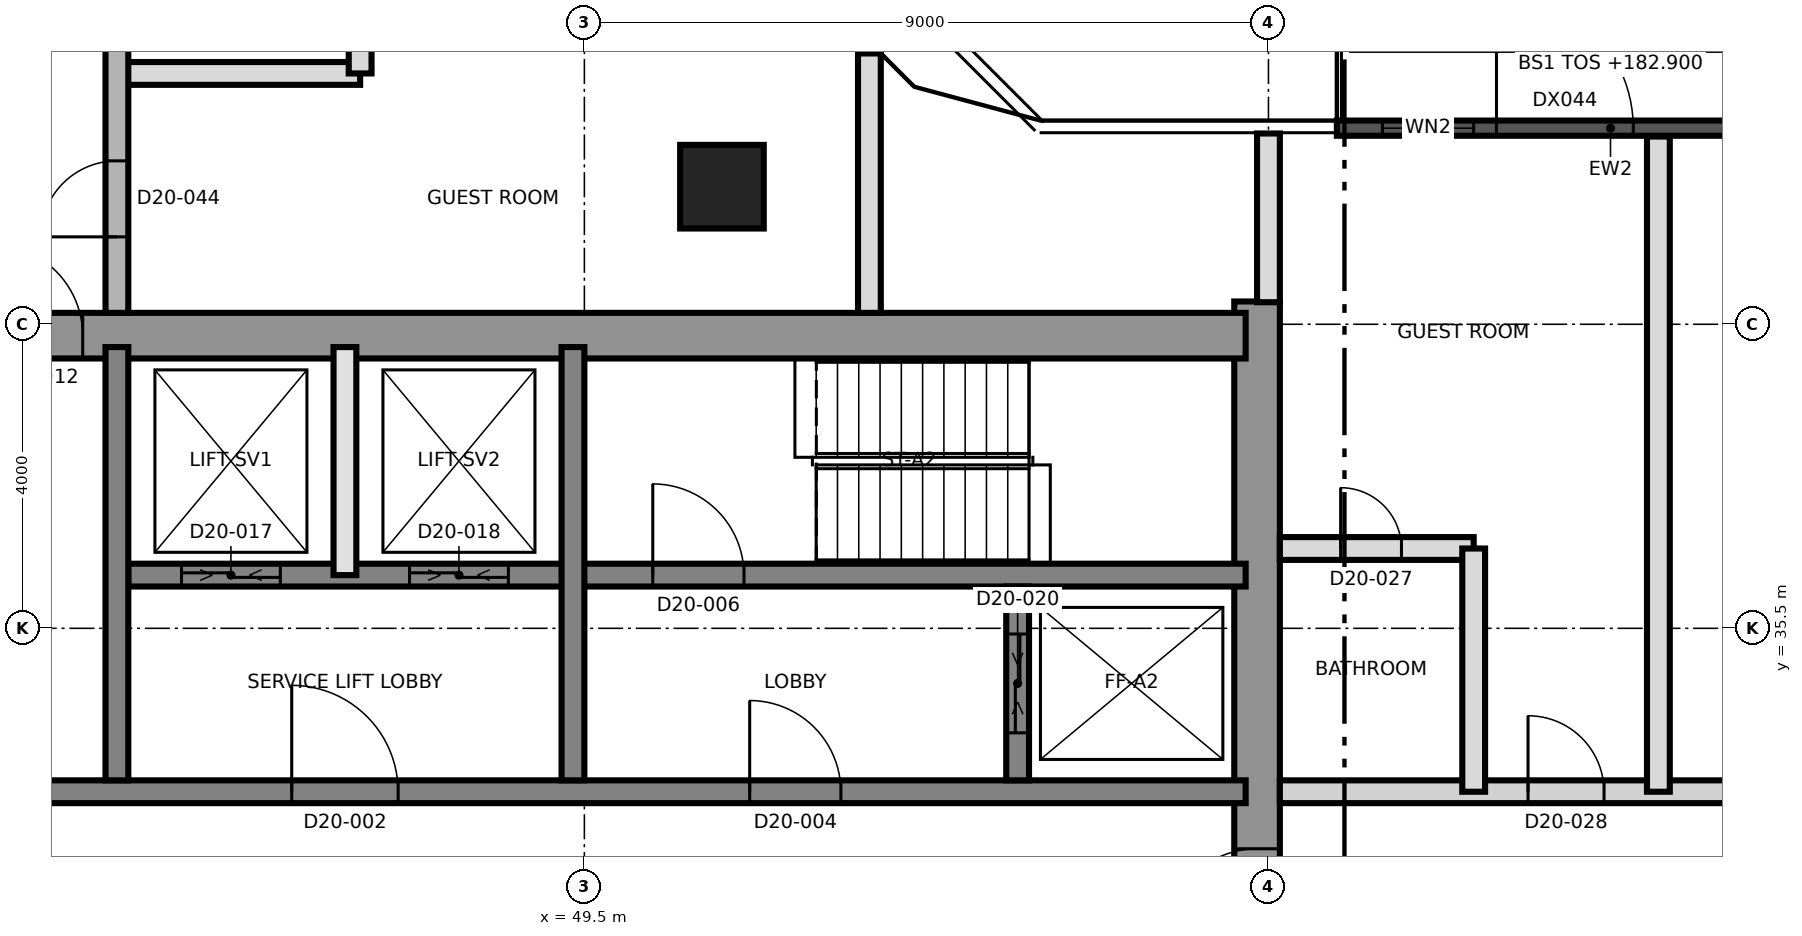
"""IFC4 building model, lengths in metres.
Left out: names, types, materials, properties, quantities, classifications, styles, units other than length and angle.
Written with IfcOpenShell. Run it as: python <this file> out.ifc"""

import sys

from ifc_helpers import new_model, si_unit, direction, frame, frame_2d, origin, origin_2d, place, context, subcontext, project, spatial, rectangle, extrude, element, fill, save


model = new_model("IFC4")
c1 = context("Model", 3, precision=1e-05, world=origin(), true_north=direction((0.0, 1.0)))
c2 = subcontext(c1, "Body", "Model", "MODEL_VIEW")
j1 = project(units=[si_unit("LENGTHUNIT", "METRE"), si_unit("PLANEANGLEUNIT", "RADIAN")], contexts=[c1])
p1 = place(None, origin())
s1 = spatial("IfcSite", under=j1, at=p1, CompositionType="ELEMENT")
p2 = place(p1, origin())
s2 = spatial("IfcBuilding", under=s1, at=p2, CompositionType="ELEMENT")
p3 = place(p2, frame((0.0, 0.0, 182.9)))
s3 = spatial("IfcBuildingStorey", under=s2, at=p3, CompositionType="ELEMENT", Elevation=182.9)
p4 = place(p3, frame((58.35, 21.2, 0.0), z_axis=(0.0, 0.0, 1.0), x_axis=(0.0, 1.0, 0.0)))
e1 = element("IfcWall", 1, at=p4, inside=s3, PredefinedType="SHEAR", context=c2, shape_type="SweptSolid", body=[
    extrude(rectangle(XDim=18.6, YDim=0.6, at=frame_2d((9.3, 0.0))), origin(), (0.0, 0.0, 1.0), 3.7),
])
p5 = place(p4, frame((10.2, 0.0, 0.0)))
e2 = element("IfcOpeningElement", 2, at=p5, cuts=e1, PredefinedType="OPENING", context=c2, shape_type="SweptSolid", body=[
    extrude(rectangle(XDim=1.2, YDim=2.1, at=frame_2d((0.6, 1.05))), frame((0.0, 0.31, 0.0), z_axis=(0.0, -1.0, 0.0), x_axis=(1.0, 0.0, 0.0)), (0.0, 0.0, 1.0), 0.62),
])
p6 = place(p3, frame((31.2, 39.35, 0.0), z_axis=(0.0, 0.0, 1.0), x_axis=(1.0, 0.0, 0.0)))
e3 = element("IfcWall", 3, at=p6, inside=s3, PredefinedType="SHEAR", context=c2, shape_type="SweptSolid", body=[
    extrude(rectangle(XDim=27.0, YDim=0.6, at=frame_2d((13.5, 0.0))), origin(), (0.0, 0.0, 1.0), 3.7),
])
p7 = place(p6, frame((10.5, 0.0, 0.0)))
e4 = element("IfcOpeningElement", 4, at=p7, cuts=e3, PredefinedType="OPENING", context=c2, shape_type="SweptSolid", body=[
    extrude(rectangle(XDim=1.2, YDim=2.1, at=frame_2d((0.6, 1.05))), frame((0.0, 0.31, 0.0), z_axis=(0.0, -1.0, 0.0), x_axis=(1.0, 0.0, 0.0)), (0.0, 0.0, 1.0), 0.62),
])
p8 = place(p3, frame((31.8, 33.35, 0.0), z_axis=(0.0, 0.0, 1.0), x_axis=(1.0, 0.0, 0.0)))
e5 = element("IfcWall", 5, at=p8, inside=s3, PredefinedType="SHEAR", context=c2, shape_type="SweptSolid", body=[
    extrude(rectangle(XDim=26.4, YDim=0.3, at=frame_2d((13.2, 0.0))), origin(), (0.0, 0.0, 1.0), 3.7),
])
p9 = place(p8, frame((13.85, 0.0, 0.0)))
e6 = element("IfcOpeningElement", 6, at=p9, cuts=e5, PredefinedType="OPENING", context=c2, shape_type="SweptSolid", body=[
    extrude(rectangle(XDim=1.4, YDim=2.1, at=frame_2d((0.7, 1.05))), frame((0.0, 0.16, 0.0), z_axis=(0.0, -1.0, 0.0), x_axis=(1.0, 0.0, 0.0)), (0.0, 0.0, 1.0), 0.32),
])
p10 = place(p8, frame((5.325, 0.0, 0.0)))
e7 = element("IfcOpeningElement", 7, at=p10, cuts=e5, PredefinedType="OPENING", context=c2, shape_type="SweptSolid", body=[
    extrude(rectangle(XDim=1.2, YDim=2.1, at=frame_2d((0.6, 1.05))), frame((0.0, 0.16, 0.0), z_axis=(0.0, -1.0, 0.0), x_axis=(1.0, 0.0, 0.0)), (0.0, 0.0, 1.0), 0.32),
])
p11 = place(p8, frame((19.875, 0.0, 0.0)))
e8 = element("IfcOpeningElement", 8, at=p11, cuts=e5, PredefinedType="OPENING", context=c2, shape_type="SweptSolid", body=[
    extrude(rectangle(XDim=1.2, YDim=2.1, at=frame_2d((0.6, 1.05))), frame((0.0, 0.16, 0.0), z_axis=(0.0, -1.0, 0.0), x_axis=(1.0, 0.0, 0.0)), (0.0, 0.0, 1.0), 0.32),
])
p12 = place(p3, frame((43.5, 36.2, 0.0), z_axis=(0.0, 0.0, 1.0), x_axis=(1.0, 0.0, 0.0)))
e9 = element("IfcWall", 9, at=p12, inside=s3, PredefinedType="SHEAR", context=c2, shape_type="SweptSolid", body=[
    extrude(rectangle(XDim=14.7, YDim=0.3, at=frame_2d((7.35, 0.0))), origin(), (0.0, 0.0, 1.0), 3.7),
])
p13 = place(p12, frame((6.9, 0.0, 0.0)))
e10 = element("IfcOpeningElement", 10, at=p13, cuts=e9, PredefinedType="OPENING", context=c2, shape_type="SweptSolid", body=[
    extrude(rectangle(XDim=1.2, YDim=2.1, at=frame_2d((0.6, 1.05))), frame((0.0, 0.16, 0.0), z_axis=(0.0, -1.0, 0.0), x_axis=(1.0, 0.0, 0.0)), (0.0, 0.0, 1.0), 0.32),
])
p14 = place(p12, frame((0.7, 0.0, 0.0)))
e11 = element("IfcOpeningElement", 11, at=p14, cuts=e9, PredefinedType="OPENING", context=c2, shape_type="SweptSolid", body=[
    extrude(rectangle(XDim=1.3, YDim=2.4, at=frame_2d((0.65, 1.2))), frame((0.0, 0.16, 0.0), z_axis=(0.0, -1.0, 0.0), x_axis=(1.0, 0.0, 0.0)), (0.0, 0.0, 1.0), 0.32),
])
p15 = place(p12, frame((3.7, 0.0, 0.0)))
e12 = element("IfcOpeningElement", 12, at=p15, cuts=e9, PredefinedType="OPENING", context=c2, shape_type="SweptSolid", body=[
    extrude(rectangle(XDim=1.3, YDim=2.4, at=frame_2d((0.65, 1.2))), frame((0.0, 0.16, 0.0), z_axis=(0.0, -1.0, 0.0), x_axis=(1.0, 0.0, 0.0)), (0.0, 0.0, 1.0), 0.32),
])
for number, where, z_axis, x_axis in (
    (13, (43.35, 33.5, 0.0), (0.0, 0.0, 1.0), (0.0, 1.0, 0.0)),
    (14, (49.35, 33.5, 0.0), (0.0, 0.0, 1.0), (0.0, 1.0, 0.0)),
):
    element("IfcWall", number, at=place(p3, frame(where, z_axis=z_axis, x_axis=x_axis)), inside=s3, PredefinedType="SHEAR", context=c2, shape_type="SweptSolid", body=[
        extrude(rectangle(XDim=5.7, YDim=0.3, at=frame_2d((2.85, 0.0))), origin(), (0.0, 0.0, 1.0), 3.7),
    ])
p16 = place(p3, frame((55.2, 33.5, 0.0), z_axis=(0.0, 0.0, 1.0), x_axis=(0.0, 1.0, 0.0)))
e15 = element("IfcWall", 15, at=p16, inside=s3, PredefinedType="SHEAR", context=c2, shape_type="SweptSolid", body=[
    extrude(rectangle(XDim=2.55, YDim=0.3, at=frame_2d((1.275, 0.0))), origin(), (0.0, 0.0, 1.0), 3.7),
])
p17 = place(p16, frame((0.625, 0.0, 0.0)))
e16 = element("IfcOpeningElement", 16, at=p17, cuts=e15, PredefinedType="OPENING", context=c2, shape_type="SweptSolid", body=[
    extrude(rectangle(XDim=1.3, YDim=2.4, at=frame_2d((0.65, 1.2))), frame((0.0, 0.16, 0.0), z_axis=(0.0, -1.0, 0.0), x_axis=(1.0, 0.0, 0.0)), (0.0, 0.0, 1.0), 0.32),
])
p18 = place(p3, frame((51.31, 41.31, 0.0), z_axis=(0.0, 0.0, 1.0), x_axis=(1.0, 0.0, 0.0)))
e17 = element("IfcColumn", 17, at=p18, inside=s3, PredefinedType="COLUMN", context=c2, shape_type="SweptSolid", body=[
    extrude(rectangle(XDim=1.1, YDim=1.1, at=origin_2d()), origin(), (0.0, 0.0, 1.0), 3.7),
])
p19 = place(p3, frame((59.4, 42.08, 0.0), z_axis=(0.0, 0.0, 1.0), x_axis=(1.0, 0.0, 0.0)))
e18 = element("IfcWall", 18, at=p19, inside=s3, PredefinedType="SOLIDWALL", context=c2, shape_type="SweptSolid", body=[
    extrude(rectangle(XDim=7.2, YDim=0.2, at=frame_2d((3.6, 0.0))), origin(), (0.0, 0.0, 1.0), 3.4),
])
p20 = place(p19, frame((2.1, 0.0, 0.0)))
e19 = element("IfcOpeningElement", 19, at=p20, cuts=e18, PredefinedType="OPENING", context=c2, shape_type="SweptSolid", body=[
    extrude(rectangle(XDim=1.8, YDim=2.4, at=frame_2d((0.9, 1.2))), frame((0.0, 0.11, 0.0), z_axis=(0.0, -1.0, 0.0), x_axis=(1.0, 0.0, 0.0)), (0.0, 0.0, 1.0), 0.22),
])
p21 = place(p19, frame((5.4, 0.0, 0.9)))
e20 = element("IfcOpeningElement", 20, at=p21, cuts=e18, PredefinedType="OPENING", context=c2, shape_type="SweptSolid", body=[
    extrude(rectangle(XDim=1.2, YDim=2.1, at=frame_2d((0.6, 1.05))), frame((0.0, 0.11, 0.0), z_axis=(0.0, -1.0, 0.0), x_axis=(1.0, 0.0, 0.0)), (0.0, 0.0, 1.0), 0.22),
])
p22 = place(p19, frame((0.6, 0.0, 0.9)))
e21 = element("IfcOpeningElement", 21, at=p22, cuts=e18, PredefinedType="OPENING", context=c2, shape_type="SweptSolid", body=[
    extrude(rectangle(XDim=1.2, YDim=2.1, at=frame_2d((0.6, 1.05))), frame((0.0, 0.11, 0.0), z_axis=(0.0, -1.0, 0.0), x_axis=(1.0, 0.0, 0.0)), (0.0, 0.0, 1.0), 0.22),
])
p23 = place(p3, frame((46.35, 36.2, 0.0), z_axis=(0.0, 0.0, 1.0), x_axis=(0.0, 1.0, 0.0)))
e22 = element("IfcWall", 22, at=p23, inside=s3, PredefinedType="SOLIDWALL", context=c2, shape_type="SweptSolid", body=[
    extrude(rectangle(XDim=3.0, YDim=0.3, at=frame_2d((1.5, 0.0))), origin(), (0.0, 0.0, 1.0), 3.4),
])
p24 = place(p3, frame((58.65, 33.35, 0.0), z_axis=(0.0, 0.0, 1.0), x_axis=(1.0, 0.0, 0.0)))
e23 = element("IfcWall", 23, at=p24, inside=s3, PredefinedType="PARTITIONING", context=c2, shape_type="SweptSolid", body=[
    extrude(rectangle(XDim=26.68, YDim=0.3, at=frame_2d((13.34, 0.0))), origin(), (0.0, 0.0, 1.0), 3.4),
])
p25 = place(p24, frame((3.265, 0.0, 0.0)))
e24 = element("IfcOpeningElement", 24, at=p25, cuts=e23, PredefinedType="OPENING", context=c2, shape_type="SweptSolid", body=[
    extrude(rectangle(XDim=1.0, YDim=2.1, at=frame_2d((0.5, 1.05))), frame((0.0, 0.16, 0.0), z_axis=(0.0, -1.0, 0.0), x_axis=(1.0, 0.0, 0.0)), (0.0, 0.0, 1.0), 0.32),
])
p26 = place(p24, frame((6.215, 0.0, 0.0)))
e25 = element("IfcOpeningElement", 25, at=p26, cuts=e23, PredefinedType="OPENING", context=c2, shape_type="SweptSolid", body=[
    extrude(rectangle(XDim=1.4, YDim=2.1, at=frame_2d((0.7, 1.05))), frame((0.0, 0.16, 0.0), z_axis=(0.0, -1.0, 0.0), x_axis=(1.0, 0.0, 0.0)), (0.0, 0.0, 1.0), 0.32),
])
p27 = place(p24, frame((9.985, 0.0, 0.0)))
e26 = element("IfcOpeningElement", 26, at=p27, cuts=e23, PredefinedType="OPENING", context=c2, shape_type="SweptSolid", body=[
    extrude(rectangle(XDim=1.2, YDim=2.1, at=frame_2d((0.6, 1.05))), frame((0.0, 0.16, 0.0), z_axis=(0.0, -1.0, 0.0), x_axis=(1.0, 0.0, 0.0)), (0.0, 0.0, 1.0), 0.32),
])
p28 = place(p24, frame((13.235, 0.0, 0.0)))
e27 = element("IfcOpeningElement", 27, at=p28, cuts=e23, PredefinedType="OPENING", context=c2, shape_type="SweptSolid", body=[
    extrude(rectangle(XDim=1.0, YDim=2.1, at=frame_2d((0.5, 1.05))), frame((0.0, 0.16, 0.0), z_axis=(0.0, -1.0, 0.0), x_axis=(1.0, 0.0, 0.0)), (0.0, 0.0, 1.0), 0.32),
])
p29 = place(p24, frame((20.2, 0.0, 0.0)))
e28 = element("IfcOpeningElement", 28, at=p29, cuts=e23, PredefinedType="OPENING", context=c2, shape_type="SweptSolid", body=[
    extrude(rectangle(XDim=1.0, YDim=2.1, at=frame_2d((0.5, 1.05))), frame((0.0, 0.16, 0.0), z_axis=(0.0, -1.0, 0.0), x_axis=(1.0, 0.0, 0.0)), (0.0, 0.0, 1.0), 0.32),
])
p30 = place(p3, frame((58.65, 36.55, 0.0), z_axis=(0.0, 0.0, 1.0), x_axis=(1.0, 0.0, 0.0)))
e29 = element("IfcWall", 29, at=p30, inside=s3, PredefinedType="PARTITIONING", context=c2, shape_type="SweptSolid", body=[
    extrude(rectangle(XDim=2.55, YDim=0.3, at=frame_2d((1.275, 0.0))), origin(), (0.0, 0.0, 1.0), 3.4),
])
p31 = place(p30, frame((0.8, 0.0, 0.0)))
e30 = element("IfcOpeningElement", 30, at=p31, cuts=e29, PredefinedType="OPENING", context=c2, shape_type="SweptSolid", body=[
    extrude(rectangle(XDim=0.8, YDim=2.1, at=frame_2d((0.4, 1.05))), frame((0.0, 0.16, 0.0), z_axis=(0.0, -1.0, 0.0), x_axis=(1.0, 0.0, 0.0)), (0.0, 0.0, 1.0), 0.32),
])
p32 = place(p3, frame((43.35, 42.8, 0.0), z_axis=(0.0, 0.0, 1.0), x_axis=(1.0, 0.0, 0.0)))
e31 = element("IfcWall", 31, at=p32, inside=s3, PredefinedType="PARTITIONING", context=c2, shape_type="SweptSolid", body=[
    extrude(rectangle(XDim=3.2, YDim=0.3, at=frame_2d((1.6, 0.0))), origin(), (0.0, 0.0, 1.0), 3.4),
])
p33 = place(p3, frame((43.35, 39.65, 0.0), z_axis=(0.0, 0.0, 1.0), x_axis=(0.0, 1.0, 0.0)))
e32 = element("IfcWall", 32, at=p33, inside=s3, PredefinedType="SHEAR", context=c2, shape_type="SweptSolid", body=[
    extrude(rectangle(XDim=27.248, YDim=0.3, at=frame_2d((13.624, 0.0))), origin(), (0.0, 0.0, 1.0), 3.4),
])
p34 = place(p33, frame((1.0, 0.0, 0.0)))
e33 = element("IfcOpeningElement", 33, at=p34, cuts=e32, PredefinedType="OPENING", context=c2, shape_type="SweptSolid", body=[
    extrude(rectangle(XDim=1.0, YDim=2.1, at=frame_2d((0.5, 1.05))), frame((0.0, 0.16, 0.0), z_axis=(0.0, -1.0, 0.0), x_axis=(1.0, 0.0, 0.0)), (0.0, 0.0, 1.0), 0.32),
])
p35 = place(p33, frame((6.85, 0.0, 0.0)))
e34 = element("IfcOpeningElement", 34, at=p35, cuts=e32, PredefinedType="OPENING", context=c2, shape_type="SweptSolid", body=[
    extrude(rectangle(XDim=1.0, YDim=2.1, at=frame_2d((0.5, 1.05))), frame((0.0, 0.16, 0.0), z_axis=(0.0, -1.0, 0.0), x_axis=(1.0, 0.0, 0.0)), (0.0, 0.0, 1.0), 0.32),
])
p36 = place(p33, frame((12.85, 0.0, 0.0)))
e35 = element("IfcOpeningElement", 35, at=p36, cuts=e32, PredefinedType="OPENING", context=c2, shape_type="SweptSolid", body=[
    extrude(rectangle(XDim=1.0, YDim=2.1, at=frame_2d((0.5, 1.05))), frame((0.0, 0.16, 0.0), z_axis=(0.0, -1.0, 0.0), x_axis=(1.0, 0.0, 0.0)), (0.0, 0.0, 1.0), 0.32),
])
p37 = place(p33, frame((19.85, 0.0, 0.0)))
e36 = element("IfcOpeningElement", 36, at=p37, cuts=e32, PredefinedType="OPENING", context=c2, shape_type="SweptSolid", body=[
    extrude(rectangle(XDim=1.0, YDim=2.1, at=frame_2d((0.5, 1.05))), frame((0.0, 0.16, 0.0), z_axis=(0.0, -1.0, 0.0), x_axis=(1.0, 0.0, 0.0)), (0.0, 0.0, 1.0), 0.32),
])
p38 = place(p3, frame((46.55, 42.8, 0.0), z_axis=(0.0, 0.0, 1.0), x_axis=(0.0, 1.0, 0.0)))
e37 = element("IfcWall", 37, at=p38, inside=s3, PredefinedType="PARTITIONING", context=c2, shape_type="SweptSolid", body=[
    extrude(rectangle(XDim=2.7, YDim=0.3, at=frame_2d((1.35, 0.0))), origin(), (0.0, 0.0, 1.0), 3.4),
])
p39 = place(p38, frame((0.95, 0.0, 0.0)))
e38 = element("IfcOpeningElement", 38, at=p39, cuts=e37, PredefinedType="OPENING", context=c2, shape_type="SweptSolid", body=[
    extrude(rectangle(XDim=0.8, YDim=2.1, at=frame_2d((0.4, 1.05))), frame((0.0, 0.16, 0.0), z_axis=(0.0, -1.0, 0.0), x_axis=(1.0, 0.0, 0.0)), (0.0, 0.0, 1.0), 0.32),
])
p40 = place(p3, frame((53.25, 39.65, 0.0), z_axis=(0.0, 0.0, 1.0), x_axis=(0.0, 1.0, 0.0)))
e39 = element("IfcWall", 39, at=p40, inside=s3, PredefinedType="PARTITIONING", context=c2, shape_type="SweptSolid", body=[
    extrude(rectangle(XDim=3.413, YDim=0.3, at=frame_2d((1.707, 0.0))), origin(), (0.0, 0.0, 1.0), 3.4),
])
p41 = place(p3, frame((58.5, 39.79, 0.0), z_axis=(0.0, 0.0, 1.0), x_axis=(0.0, 1.0, 0.0)))
e40 = element("IfcWall", 40, at=p41, inside=s3, PredefinedType="PARTITIONING", context=c2, shape_type="SweptSolid", body=[
    extrude(rectangle(XDim=2.22, YDim=0.3, at=frame_2d((1.11, 0.0))), origin(), (0.0, 0.0, 1.0), 3.4),
])
p42 = place(p3, frame((61.2, 33.35, 0.0), z_axis=(0.0, 0.0, 1.0), x_axis=(0.0, 1.0, 0.0)))
e41 = element("IfcWall", 41, at=p42, inside=s3, PredefinedType="PARTITIONING", context=c2, shape_type="SweptSolid", body=[
    extrude(rectangle(XDim=3.2, YDim=0.3, at=frame_2d((1.6, 0.0))), origin(), (0.0, 0.0, 1.0), 3.4),
])
p43 = place(p3, frame((63.63, 33.35, 0.0), z_axis=(0.0, 0.0, 1.0), x_axis=(0.0, 1.0, 0.0)))
e42 = element("IfcWall", 42, at=p43, inside=s3, PredefinedType="PARTITIONING", context=c2, shape_type="SweptSolid", body=[
    extrude(rectangle(XDim=8.62, YDim=0.3, at=frame_2d((4.31, 0.0))), origin(), (0.0, 0.0, 1.0), 3.4),
])
p44 = place(p20, origin())
e43 = element("IfcDoor", 43, at=p44, inside=s3, OperationType="SINGLE_SWING_LEFT", PredefinedType="DOOR", context=c2, shape_type="SweptSolid", body=[
    extrude(rectangle(XDim=1.8, YDim=2.4, at=frame_2d((0.9, 1.2))), frame((0.0, 0.025, 0.0), z_axis=(0.0, -1.0, 0.0), x_axis=(1.0, 0.0, 0.0)), (0.0, 0.0, 1.0), 0.05),
])
fill(e19, e43)
p45 = place(p22, origin())
e44 = element("IfcWindow", 44, at=p45, inside=s3, PartitioningType="SINGLE_PANEL", PredefinedType="WINDOW", context=c2, shape_type="SweptSolid", body=[
    extrude(rectangle(XDim=1.2, YDim=2.1, at=frame_2d((0.6, 1.05))), frame((0.0, 0.03, 0.0), z_axis=(0.0, -1.0, 0.0), x_axis=(1.0, 0.0, 0.0)), (0.0, 0.0, 1.0), 0.06),
])
fill(e21, e44)
p46 = place(p9, origin())
e45 = element("IfcDoor", 45, at=p46, inside=s3, OperationType="SINGLE_SWING_RIGHT", PredefinedType="DOOR", context=c2, shape_type="SweptSolid", body=[
    extrude(rectangle(XDim=1.4, YDim=2.1, at=frame_2d((0.7, 1.05))), frame((0.0, 0.025, 0.0), z_axis=(0.0, -1.0, 0.0), x_axis=(1.0, 0.0, 0.0)), (0.0, 0.0, 1.0), 0.05),
])
fill(e6, e45)
p47 = place(p11, origin())
e46 = element("IfcDoor", 46, at=p47, inside=s3, OperationType="SINGLE_SWING_RIGHT", PredefinedType="DOOR", context=c2, shape_type="SweptSolid", body=[
    extrude(rectangle(XDim=1.2, YDim=2.1, at=frame_2d((0.6, 1.05))), frame((0.0, 0.025, 0.0), z_axis=(0.0, -1.0, 0.0), x_axis=(1.0, 0.0, 0.0)), (0.0, 0.0, 1.0), 0.05),
])
fill(e8, e46)
p48 = place(p13, origin())
e47 = element("IfcDoor", 47, at=p48, inside=s3, OperationType="SINGLE_SWING_LEFT", PredefinedType="DOOR", context=c2, shape_type="SweptSolid", body=[
    extrude(rectangle(XDim=1.2, YDim=2.1, at=frame_2d((0.6, 1.05))), frame((0.0, 0.025, 0.0), z_axis=(0.0, -1.0, 0.0), x_axis=(1.0, 0.0, 0.0)), (0.0, 0.0, 1.0), 0.05),
])
fill(e10, e47)
p49 = place(p5, origin())
e48 = element("IfcDoor", 48, at=p49, inside=s3, OperationType="SINGLE_SWING_LEFT", PredefinedType="DOOR", context=c2, shape_type="SweptSolid", body=[
    extrude(rectangle(XDim=1.2, YDim=2.1, at=frame_2d((0.6, 1.05))), frame((0.0, 0.025, 0.0), z_axis=(0.0, -1.0, 0.0), x_axis=(1.0, 0.0, 0.0)), (0.0, 0.0, 1.0), 0.05),
])
fill(e2, e48)
p50 = place(p7, origin())
e49 = element("IfcDoor", 49, at=p50, inside=s3, OperationType="SINGLE_SWING_RIGHT", PredefinedType="DOOR", context=c2, shape_type="SweptSolid", body=[
    extrude(rectangle(XDim=1.2, YDim=2.1, at=frame_2d((0.6, 1.05))), frame((0.0, 0.025, 0.0), z_axis=(0.0, -1.0, 0.0), x_axis=(1.0, 0.0, 0.0)), (0.0, 0.0, 1.0), 0.05),
])
fill(e4, e49)
p51 = place(p14, origin())
e50 = element("IfcDoor", 50, at=p51, inside=s3, OperationType="SLIDING_TO_LEFT", PredefinedType="DOOR", context=c2, shape_type="SweptSolid", body=[
    extrude(rectangle(XDim=1.3, YDim=2.4, at=frame_2d((0.65, 1.2))), frame((0.0, 0.025, 0.0), z_axis=(0.0, -1.0, 0.0), x_axis=(1.0, 0.0, 0.0)), (0.0, 0.0, 1.0), 0.05),
])
fill(e11, e50)
p52 = place(p15, origin())
e51 = element("IfcDoor", 51, at=p52, inside=s3, OperationType="SLIDING_TO_LEFT", PredefinedType="DOOR", context=c2, shape_type="SweptSolid", body=[
    extrude(rectangle(XDim=1.3, YDim=2.4, at=frame_2d((0.65, 1.2))), frame((0.0, 0.025, 0.0), z_axis=(0.0, -1.0, 0.0), x_axis=(1.0, 0.0, 0.0)), (0.0, 0.0, 1.0), 0.05),
])
fill(e12, e51)
p53 = place(p17, origin())
e52 = element("IfcDoor", 52, at=p53, inside=s3, OperationType="SLIDING_TO_LEFT", PredefinedType="DOOR", context=c2, shape_type="SweptSolid", body=[
    extrude(rectangle(XDim=1.3, YDim=2.4, at=frame_2d((0.65, 1.2))), frame((0.0, 0.025, 0.0), z_axis=(0.0, -1.0, 0.0), x_axis=(1.0, 0.0, 0.0)), (0.0, 0.0, 1.0), 0.05),
])
fill(e16, e52)
p54 = place(p31, origin())
e53 = element("IfcDoor", 53, at=p54, inside=s3, OperationType="SINGLE_SWING_LEFT", PredefinedType="DOOR", context=c2, shape_type="SweptSolid", body=[
    extrude(rectangle(XDim=0.8, YDim=2.1, at=frame_2d((0.4, 1.05))), frame((0.0, 0.025, 0.0), z_axis=(0.0, -1.0, 0.0), x_axis=(1.0, 0.0, 0.0)), (0.0, 0.0, 1.0), 0.05),
])
fill(e30, e53)
p55 = place(p25, origin())
e54 = element("IfcDoor", 54, at=p55, inside=s3, OperationType="SINGLE_SWING_LEFT", PredefinedType="DOOR", context=c2, shape_type="SweptSolid", body=[
    extrude(rectangle(XDim=1.0, YDim=2.1, at=frame_2d((0.5, 1.05))), frame((0.0, 0.025, 0.0), z_axis=(0.0, -1.0, 0.0), x_axis=(1.0, 0.0, 0.0)), (0.0, 0.0, 1.0), 0.05),
])
fill(e24, e54)
p56 = place(p34, origin())
e55 = element("IfcDoor", 55, at=p56, inside=s3, OperationType="SINGLE_SWING_LEFT", PredefinedType="DOOR", context=c2, shape_type="SweptSolid", body=[
    extrude(rectangle(XDim=1.0, YDim=2.1, at=frame_2d((0.5, 1.05))), frame((0.0, 0.025, 0.0), z_axis=(0.0, -1.0, 0.0), x_axis=(1.0, 0.0, 0.0)), (0.0, 0.0, 1.0), 0.05),
])
fill(e33, e55)
save(model, sys.argv[1])
